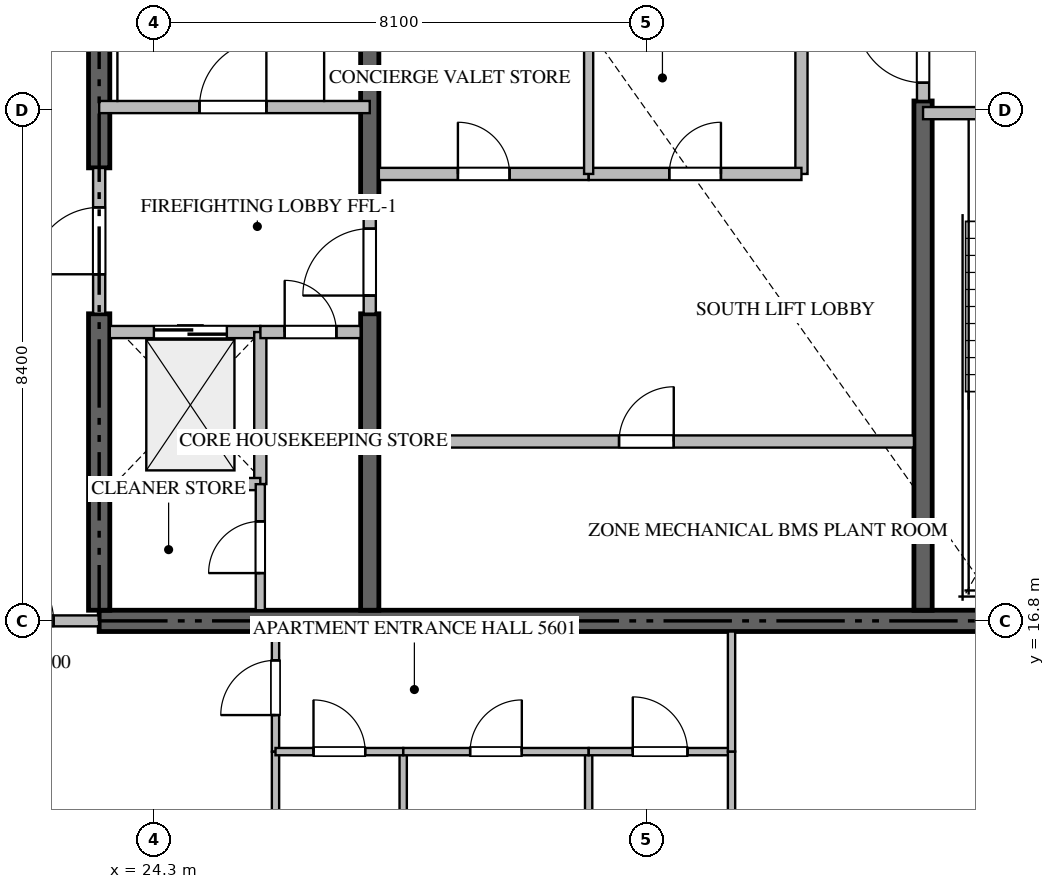
"""IFC4 building model, lengths in metres.
Left out: names, types, materials, properties, quantities, classifications, styles, units other than length and angle.
Written with IfcOpenShell. Run it as: python <this file> out.ifc"""

import sys

from ifc_helpers import new_model, si_unit, direction, frame, frame_2d, origin, place, context, subcontext, project, spatial, rectangle, extrude, source, transform, mapped, element, fill, save


model = new_model("IFC4")
c1 = context("Model", 3, precision=1e-05, world=origin(), true_north=direction((0.0, 1.0)))
c2 = subcontext(c1, "Body", "Model", "MODEL_VIEW")
j1 = project(units=[si_unit("LENGTHUNIT", "METRE"), si_unit("PLANEANGLEUNIT", "RADIAN")], contexts=[c1])
p1 = place(None, origin())
s1 = spatial("IfcSite", under=j1, at=p1, CompositionType="ELEMENT")
p2 = place(p1, origin())
s2 = spatial("IfcBuilding", under=s1, at=p2, CompositionType="ELEMENT")
p3 = place(p2, frame((0.0, 0.0, 225.85)))
s3 = spatial("IfcBuildingStorey", under=s2, at=p3, CompositionType="ELEMENT", Elevation=225.85)
p4 = place(p3, frame((23.4, 16.8, -0.26), z_axis=(0.0, 0.0, 1.0), x_axis=(1.0, 0.0, 0.0)))
e1 = element("IfcWall", 1, at=p4, inside=s3, PredefinedType="SHEAR", context=c2, shape_type="SweptSolid", body=[
    extrude(rectangle(XDim=18.0, YDim=0.35, at=frame_2d((9.0, 0.0))), origin(), (0.0, 0.0, 1.0), 3.848),
])
p5 = place(p3, frame((23.4, 16.975, -0.26), z_axis=(0.0, 0.0, 1.0), x_axis=(0.0, 1.0, 0.0)))
e2 = element("IfcWall", 2, at=p5, inside=s3, PredefinedType="SHEAR", context=c2, shape_type="SweptSolid", body=[
    extrude(rectangle(XDim=4.875, YDim=0.35, at=frame_2d((2.438, 0.0))), origin(), (0.0, 0.0, 1.0), 3.848),
])
p6 = place(p3, frame((23.4, 24.25, -0.26), z_axis=(0.0, 0.0, 1.0), x_axis=(0.0, 1.0, 0.0)))
e3 = element("IfcWall", 3, at=p6, inside=s3, PredefinedType="SHEAR", context=c2, shape_type="SweptSolid", body=[
    extrude(rectangle(XDim=9.175, YDim=0.35, at=frame_2d((4.587, 0.0))), origin(), (0.0, 0.0, 1.0), 3.848),
])
p7 = place(p3, frame((27.85, 16.975, -0.26), z_axis=(0.0, 0.0, 1.0), x_axis=(0.0, 1.0, 0.0)))
e4 = element("IfcWall", 4, at=p7, inside=s3, PredefinedType="SHEAR", context=c2, shape_type="SweptSolid", body=[
    extrude(rectangle(XDim=4.875, YDim=0.3, at=frame_2d((2.438, 0.0))), origin(), (0.0, 0.0, 1.0), 3.848),
])
p8 = place(p3, frame((27.85, 23.55, -0.26), z_axis=(0.0, 0.0, 1.0), x_axis=(0.0, 1.0, 0.0)))
e5 = element("IfcWall", 5, at=p8, inside=s3, PredefinedType="SHEAR", context=c2, shape_type="SweptSolid", body=[
    extrude(rectangle(XDim=9.875, YDim=0.3, at=frame_2d((4.938, 0.0))), origin(), (0.0, 0.0, 1.0), 3.848),
])
p9 = place(p3, frame((36.95, 16.975, -0.26), z_axis=(0.0, 0.0, 1.0), x_axis=(0.0, 1.0, 0.0)))
e6 = element("IfcWall", 6, at=p9, inside=s3, PredefinedType="SHEAR", context=c2, shape_type="SweptSolid", body=[
    extrude(rectangle(XDim=8.375, YDim=0.3, at=frame_2d((4.188, 0.0))), origin(), (0.0, 0.0, 1.0), 3.848),
])
p10 = place(p3, frame((23.4, 25.25, 0.0), z_axis=(0.0, 0.0, 1.0), x_axis=(1.0, 0.0, 0.0)))
e7 = element("IfcWall", 7, at=p10, inside=s3, PredefinedType="STANDARD", context=c2, shape_type="SweptSolid", body=[
    extrude(rectangle(XDim=4.45, YDim=0.2, at=frame_2d((2.225, 0.0))), origin(), (0.0, 0.0, 1.0), 3.59),
])
p11 = place(p10, frame((1.65, 0.0, 0.0)))
e8 = element("IfcOpeningElement", 8, at=p11, cuts=e7, PredefinedType="OPENING", context=c2, shape_type="SweptSolid", body=[
    extrude(rectangle(XDim=1.1, YDim=2.15, at=frame_2d((0.55, 1.075))), frame((0.0, 0.11, 0.0), z_axis=(0.0, -1.0, 0.0), x_axis=(1.0, 0.0, 0.0)), (0.0, 0.0, 1.0), 0.22),
])
p12 = place(p3, frame((36.95, 25.15, 0.0), z_axis=(0.0, 0.0, 1.0), x_axis=(1.0, 0.0, 0.0)))
e9 = element("IfcWall", 9, at=p12, inside=s3, PredefinedType="STANDARD", context=c2, shape_type="SweptSolid", body=[
    extrude(rectangle(XDim=4.45, YDim=0.2, at=frame_2d((2.225, 0.0))), origin(), (0.0, 0.0, 1.0), 3.59),
])
p13 = place(p12, frame((1.65, 0.0, 0.0)))
e10 = element("IfcOpeningElement", 10, at=p13, cuts=e9, PredefinedType="OPENING", context=c2, shape_type="SweptSolid", body=[
    extrude(rectangle(XDim=1.1, YDim=2.15, at=frame_2d((0.55, 1.075))), frame((0.0, 0.11, 0.0), z_axis=(0.0, -1.0, 0.0), x_axis=(1.0, 0.0, 0.0)), (0.0, 0.0, 1.0), 0.22),
])
p14 = place(p3, frame((23.575, 21.55, 0.0), z_axis=(0.0, 0.0, 1.0), x_axis=(1.0, 0.0, 0.0)))
e11 = element("IfcWall", 11, at=p14, inside=s3, PredefinedType="STANDARD", context=c2, shape_type="SweptSolid", body=[
    extrude(rectangle(XDim=2.475, YDim=0.2, at=frame_2d((1.238, 0.0))), origin(), (0.0, 0.0, 1.0), 3.59),
])
p15 = place(p14, frame((0.725, 0.0, 0.0)))
e12 = element("IfcOpeningElement", 12, at=p15, cuts=e11, PredefinedType="OPENING", context=c2, shape_type="SweptSolid", body=[
    extrude(rectangle(XDim=1.2, YDim=2.2, at=frame_2d((0.6, 1.1))), frame((0.0, 0.11, 0.0), z_axis=(0.0, -1.0, 0.0), x_axis=(1.0, 0.0, 0.0)), (0.0, 0.0, 1.0), 0.22),
])
p16 = place(p3, frame((26.05, 19.05, 0.0), z_axis=(0.0, 0.0, 1.0), x_axis=(0.0, 1.0, 0.0)))
e13 = element("IfcWall", 13, at=p16, inside=s3, PredefinedType="STANDARD", context=c2, shape_type="SweptSolid", body=[
    extrude(rectangle(XDim=2.5, YDim=0.2, at=frame_2d((1.25, 0.0))), origin(), (0.0, 0.0, 1.0), 3.59),
])
p17 = place(p3, frame((23.575, 19.05, 0.0), z_axis=(0.0, 0.0, 1.0), x_axis=(1.0, 0.0, 0.0)))
e14 = element("IfcWall", 14, at=p17, inside=s3, PredefinedType="STANDARD", context=c2, shape_type="SweptSolid", body=[
    extrude(rectangle(XDim=2.475, YDim=0.2, at=frame_2d((1.238, 0.0))), origin(), (0.0, 0.0, 1.0), 3.59),
])
p18 = place(p3, frame((26.052, 21.55, 0.0), z_axis=(0.0, 0.0, 1.0), x_axis=(1.0, 0.0, 0.0)))
e15 = element("IfcWall", 15, at=p18, inside=s3, PredefinedType="STANDARD", context=c2, shape_type="SweptSolid", body=[
    extrude(rectangle(XDim=1.648, YDim=0.2, at=frame_2d((0.824, 0.0))), origin(), (0.0, 0.0, 1.0), 3.59),
])
p19 = place(p18, frame((0.399, 0.0, 0.0)))
e16 = element("IfcOpeningElement", 16, at=p19, cuts=e15, PredefinedType="OPENING", context=c2, shape_type="SweptSolid", body=[
    extrude(rectangle(XDim=0.85, YDim=2.1, at=frame_2d((0.425, 1.05))), frame((0.0, 0.11, 0.0), z_axis=(0.0, -1.0, 0.0), x_axis=(1.0, 0.0, 0.0)), (0.0, 0.0, 1.0), 0.22),
])
p20 = place(p3, frame((23.4, 21.852, 0.0), z_axis=(0.0, 0.0, 1.0), x_axis=(0.0, 1.0, 0.0)))
e17 = element("IfcWall", 17, at=p20, inside=s3, PredefinedType="STANDARD", context=c2, shape_type="SweptSolid", body=[
    extrude(rectangle(XDim=2.396, YDim=0.2, at=frame_2d((1.198, 0.0))), origin(), (0.0, 0.0, 1.0), 3.59),
])
p21 = place(p20, frame((0.648, 0.0, 0.0)))
e18 = element("IfcOpeningElement", 18, at=p21, cuts=e17, PredefinedType="OPENING", context=c2, shape_type="SweptSolid", body=[
    extrude(rectangle(XDim=1.1, YDim=2.15, at=frame_2d((0.55, 1.075))), frame((0.0, 0.11, 0.0), z_axis=(0.0, -1.0, 0.0), x_axis=(1.0, 0.0, 0.0)), (0.0, 0.0, 1.0), 0.22),
])
p22 = place(p3, frame((27.85, 21.852, 0.0), z_axis=(0.0, 0.0, 1.0), x_axis=(0.0, 1.0, 0.0)))
e19 = element("IfcWall", 19, at=p22, inside=s3, PredefinedType="STANDARD", context=c2, shape_type="SweptSolid", body=[
    extrude(rectangle(XDim=1.696, YDim=0.2, at=frame_2d((0.848, 0.0))), origin(), (0.0, 0.0, 1.0), 3.59),
])
p23 = place(p22, frame((0.298, 0.0, 0.0)))
e20 = element("IfcOpeningElement", 20, at=p23, cuts=e19, PredefinedType="OPENING", context=c2, shape_type="SweptSolid", body=[
    extrude(rectangle(XDim=1.1, YDim=2.15, at=frame_2d((0.55, 1.075))), frame((0.0, 0.11, 0.0), z_axis=(0.0, -1.0, 0.0), x_axis=(1.0, 0.0, 0.0)), (0.0, 0.0, 1.0), 0.22),
])
p24 = place(p3, frame((36.95, 25.352, 0.0), z_axis=(0.0, 0.0, 1.0), x_axis=(0.0, 1.0, 0.0)))
e21 = element("IfcWall", 21, at=p24, inside=s3, PredefinedType="STANDARD", context=c2, shape_type="SweptSolid", body=[
    extrude(rectangle(XDim=1.696, YDim=0.2, at=frame_2d((0.848, 0.0))), origin(), (0.0, 0.0, 1.0), 3.59),
])
p25 = place(p24, frame((0.298, 0.0, 0.0)))
e22 = element("IfcOpeningElement", 22, at=p25, cuts=e21, PredefinedType="OPENING", context=c2, shape_type="SweptSolid", body=[
    extrude(rectangle(XDim=1.1, YDim=2.15, at=frame_2d((0.55, 1.075))), frame((0.0, 0.11, 0.0), z_axis=(0.0, -1.0, 0.0), x_axis=(1.0, 0.0, 0.0)), (0.0, 0.0, 1.0), 0.22),
])
p26 = place(p3, frame((26.05, 16.975, 0.0), z_axis=(0.0, 0.0, 1.0), x_axis=(0.0, 1.0, 0.0)))
e23 = element("IfcWall", 23, at=p26, inside=s3, PredefinedType="PARTITIONING", context=c2, shape_type="SweptSolid", body=[
    extrude(rectangle(XDim=2.073, YDim=0.15, at=frame_2d((1.037, 0.0))), origin(), (0.0, 0.0, 1.0), 3.59),
])
p27 = place(p26, frame((0.611, 0.0, 0.0)))
e24 = element("IfcOpeningElement", 24, at=p27, cuts=e23, PredefinedType="OPENING", context=c2, shape_type="SweptSolid", body=[
    extrude(rectangle(XDim=0.85, YDim=2.1, at=frame_2d((0.425, 1.05))), frame((0.0, 0.085, 0.0), z_axis=(0.0, -1.0, 0.0), x_axis=(1.0, 0.0, 0.0)), (0.0, 0.0, 1.0), 0.17),
])
p28 = place(p3, frame((28.0, 19.75, 0.0), z_axis=(0.0, 0.0, 1.0), x_axis=(1.0, 0.0, 0.0)))
e25 = element("IfcWall", 25, at=p28, inside=s3, PredefinedType="STANDARD", context=c2, shape_type="SweptSolid", body=[
    extrude(rectangle(XDim=8.8, YDim=0.2, at=frame_2d((4.4, 0.0))), origin(), (0.0, 0.0, 1.0), 3.59),
])
p29 = place(p28, frame((3.95, 0.0, 0.0)))
e26 = element("IfcOpeningElement", 26, at=p29, cuts=e25, PredefinedType="OPENING", context=c2, shape_type="SweptSolid", body=[
    extrude(rectangle(XDim=0.9, YDim=2.1, at=frame_2d((0.45, 1.05))), frame((0.0, 0.11, 0.0), z_axis=(0.0, -1.0, 0.0), x_axis=(1.0, 0.0, 0.0)), (0.0, 0.0, 1.0), 0.22),
])
p30 = place(p3, frame((34.95, 24.15, 0.0), z_axis=(0.0, 0.0, 1.0), x_axis=(0.0, 1.0, 0.0)))
e27 = element("IfcWall", 27, at=p30, inside=s3, PredefinedType="STANDARD", context=c2, shape_type="SweptSolid", body=[
    extrude(rectangle(XDim=2.8, YDim=0.2, at=frame_2d((1.4, 0.0))), origin(), (0.0, 0.0, 1.0), 3.59),
])
p31 = place(p3, frame((28.0, 24.15, 0.0), z_axis=(0.0, 0.0, 1.0), x_axis=(1.0, 0.0, 0.0)))
e28 = element("IfcWall", 28, at=p31, inside=s3, PredefinedType="STANDARD", context=c2, shape_type="SweptSolid", body=[
    extrude(rectangle(XDim=3.45, YDim=0.2, at=frame_2d((1.725, 0.0))), origin(), (0.0, 0.0, 1.0), 3.59),
])
p32 = place(p31, frame((1.3, 0.0, 0.0)))
e29 = element("IfcOpeningElement", 29, at=p32, cuts=e28, PredefinedType="OPENING", context=c2, shape_type="SweptSolid", body=[
    extrude(rectangle(XDim=0.85, YDim=2.1, at=frame_2d((0.425, 1.05))), frame((0.0, 0.11, 0.0), z_axis=(0.0, -1.0, 0.0), x_axis=(1.0, 0.0, 0.0)), (0.0, 0.0, 1.0), 0.22),
])
p33 = place(p3, frame((31.452, 24.15, 0.0), z_axis=(0.0, 0.0, 1.0), x_axis=(1.0, 0.0, 0.0)))
e30 = element("IfcWall", 30, at=p33, inside=s3, PredefinedType="STANDARD", context=c2, shape_type="SweptSolid", body=[
    extrude(rectangle(XDim=3.498, YDim=0.2, at=frame_2d((1.749, 0.0))), origin(), (0.0, 0.0, 1.0), 3.59),
])
p34 = place(p33, frame((1.324, 0.0, 0.0)))
e31 = element("IfcOpeningElement", 31, at=p34, cuts=e30, PredefinedType="OPENING", context=c2, shape_type="SweptSolid", body=[
    extrude(rectangle(XDim=0.85, YDim=2.1, at=frame_2d((0.425, 1.05))), frame((0.0, 0.11, 0.0), z_axis=(0.0, -1.0, 0.0), x_axis=(1.0, 0.0, 0.0)), (0.0, 0.0, 1.0), 0.22),
])
p35 = place(p3, frame((31.45, 24.15, 0.0), z_axis=(0.0, 0.0, 1.0), x_axis=(0.0, 1.0, 0.0)))
e32 = element("IfcWall", 32, at=p35, inside=s3, PredefinedType="PARTITIONING", context=c2, shape_type="SweptSolid", body=[
    extrude(rectangle(XDim=2.8, YDim=0.15, at=frame_2d((1.4, 0.0))), origin(), (0.0, 0.0, 1.0), 3.59),
])
p36 = place(p3, frame((20.902, 16.8, 0.0), z_axis=(0.0, 0.0, 1.0), x_axis=(1.0, 0.0, 0.0)))
e33 = element("IfcWall", 33, at=p36, inside=s3, PredefinedType="PARTITIONING", context=c2, shape_type="SweptSolid", body=[
    extrude(rectangle(XDim=2.496, YDim=0.18, at=frame_2d((1.248, 0.0))), origin(), (0.0, 0.0, 1.0), 3.59),
])
p37 = place(p36, frame((0.748, 0.0, 0.0)))
e34 = element("IfcOpeningElement", 34, at=p37, cuts=e33, PredefinedType="OPENING", context=c2, shape_type="SweptSolid", body=[
    extrude(rectangle(XDim=1.0, YDim=2.15, at=frame_2d((0.5, 1.075))), frame((0.0, 0.1, 0.0), z_axis=(0.0, -1.0, 0.0), x_axis=(1.0, 0.0, 0.0)), (0.0, 0.0, 1.0), 0.2),
])
p38 = place(p3, frame((26.3, 14.65, 0.0), z_axis=(0.0, 0.0, 1.0), x_axis=(0.0, 1.0, 0.0)))
e35 = element("IfcWall", 35, at=p38, inside=s3, PredefinedType="PARTITIONING", context=c2, shape_type="SweptSolid", body=[
    extrude(rectangle(XDim=1.975, YDim=0.12, at=frame_2d((0.988, 0.0))), origin(), (0.0, 0.0, 1.0), 3.59),
])
p39 = place(p38, frame((0.601, 0.0, 0.0)))
e36 = element("IfcOpeningElement", 36, at=p39, cuts=e35, PredefinedType="OPENING", context=c2, shape_type="SweptSolid", body=[
    extrude(rectangle(XDim=0.9, YDim=2.1, at=frame_2d((0.45, 1.05))), frame((0.0, 0.07, 0.0), z_axis=(0.0, -1.0, 0.0), x_axis=(1.0, 0.0, 0.0)), (0.0, 0.0, 1.0), 0.14),
])
p40 = place(p3, frame((26.3, 7.862, 0.0), z_axis=(0.0, 0.0, 1.0), x_axis=(0.0, 1.0, 0.0)))
e37 = element("IfcWall", 37, at=p40, inside=s3, PredefinedType="PARTITIONING", context=c2, shape_type="SweptSolid", body=[
    extrude(rectangle(XDim=6.786, YDim=0.12, at=frame_2d((3.393, 0.0))), origin(), (0.0, 0.0, 1.0), 3.59),
])
p41 = place(p3, frame((31.45, 1.295, 0.0), z_axis=(0.0, 0.0, 1.0), x_axis=(0.0, 1.0, 0.0)))
e38 = element("IfcWall", 38, at=p41, inside=s3, PredefinedType="PARTITIONING", context=c2, shape_type="SweptSolid", body=[
    extrude(rectangle(XDim=13.355, YDim=0.12, at=frame_2d((6.677, 0.0))), origin(), (0.0, 0.0, 1.0), 3.59),
])
p42 = place(p3, frame((28.4, 7.86, 0.0), z_axis=(0.0, 0.0, 1.0), x_axis=(0.0, 1.0, 0.0)))
e39 = element("IfcWall", 39, at=p42, inside=s3, PredefinedType="PARTITIONING", context=c2, shape_type="SweptSolid", body=[
    extrude(rectangle(XDim=6.79, YDim=0.12, at=frame_2d((3.395, 0.0))), origin(), (0.0, 0.0, 1.0), 3.59),
])
p43 = place(p3, frame((26.3, 14.65, 0.0), z_axis=(0.0, 0.0, 1.0), x_axis=(1.0, 0.0, 0.0)))
e40 = element("IfcWall", 40, at=p43, inside=s3, PredefinedType="PARTITIONING", context=c2, shape_type="SweptSolid", body=[
    extrude(rectangle(XDim=2.1, YDim=0.12, at=frame_2d((1.05, 0.0))), origin(), (0.0, 0.0, 1.0), 3.59),
])
p44 = place(p43, frame((0.625, 0.0, 0.0)))
e41 = element("IfcOpeningElement", 41, at=p44, cuts=e40, PredefinedType="OPENING", context=c2, shape_type="SweptSolid", body=[
    extrude(rectangle(XDim=0.85, YDim=2.1, at=frame_2d((0.425, 1.05))), frame((0.0, 0.07, 0.0), z_axis=(0.0, -1.0, 0.0), x_axis=(1.0, 0.0, 0.0)), (0.0, 0.0, 1.0), 0.14),
])
p45 = place(p3, frame((28.402, 14.65, 0.0), z_axis=(0.0, 0.0, 1.0), x_axis=(1.0, 0.0, 0.0)))
e42 = element("IfcWall", 42, at=p45, inside=s3, PredefinedType="PARTITIONING", context=c2, shape_type="SweptSolid", body=[
    extrude(rectangle(XDim=3.048, YDim=0.12, at=frame_2d((1.524, 0.0))), origin(), (0.0, 0.0, 1.0), 3.59),
])
p46 = place(p45, frame((1.099, 0.0, 0.0)))
e43 = element("IfcOpeningElement", 43, at=p46, cuts=e42, PredefinedType="OPENING", context=c2, shape_type="SweptSolid", body=[
    extrude(rectangle(XDim=0.85, YDim=2.1, at=frame_2d((0.425, 1.05))), frame((0.0, 0.07, 0.0), z_axis=(0.0, -1.0, 0.0), x_axis=(1.0, 0.0, 0.0)), (0.0, 0.0, 1.0), 0.14),
])
p47 = place(p3, frame((31.452, 14.65, 0.0), z_axis=(0.0, 0.0, 1.0), x_axis=(1.0, 0.0, 0.0)))
e44 = element("IfcWall", 44, at=p47, inside=s3, PredefinedType="PARTITIONING", context=c2, shape_type="SweptSolid", body=[
    extrude(rectangle(XDim=2.348, YDim=0.12, at=frame_2d((1.174, 0.0))), origin(), (0.0, 0.0, 1.0), 3.59),
])
p48 = place(p47, frame((0.724, 0.0, 0.0)))
e45 = element("IfcOpeningElement", 45, at=p48, cuts=e44, PredefinedType="OPENING", context=c2, shape_type="SweptSolid", body=[
    extrude(rectangle(XDim=0.9, YDim=2.1, at=frame_2d((0.45, 1.05))), frame((0.0, 0.07, 0.0), z_axis=(0.0, -1.0, 0.0), x_axis=(1.0, 0.0, 0.0)), (0.0, 0.0, 1.0), 0.14),
])
p49 = place(p3, frame((33.8, 8.59, 0.0), z_axis=(0.0, 0.0, 1.0), x_axis=(0.0, 1.0, 0.0)))
e46 = element("IfcWall", 46, at=p49, inside=s3, PredefinedType="PARTITIONING", context=c2, shape_type="SweptSolid", body=[
    extrude(rectangle(XDim=6.06, YDim=0.12, at=frame_2d((3.03, 0.0))), origin(), (0.0, 0.0, 1.0), 3.59),
])
p50 = place(p49, frame((2.605, 0.0, 0.0)))
e47 = element("IfcOpeningElement", 47, at=p50, cuts=e46, PredefinedType="OPENING", context=c2, shape_type="SweptSolid", body=[
    extrude(rectangle(XDim=0.85, YDim=2.1, at=frame_2d((0.425, 1.05))), frame((0.0, 0.07, 0.0), z_axis=(0.0, -1.0, 0.0), x_axis=(1.0, 0.0, 0.0)), (0.0, 0.0, 1.0), 0.14),
])
p51 = place(p3, frame((33.8, 14.652, 0.0), z_axis=(0.0, 0.0, 1.0), x_axis=(0.0, 1.0, 0.0)))
e48 = element("IfcWall", 48, at=p51, inside=s3, PredefinedType="PARTITIONING", context=c2, shape_type="SweptSolid", body=[
    extrude(rectangle(XDim=1.973, YDim=0.12, at=frame_2d((0.986, 0.0))), origin(), (0.0, 0.0, 1.0), 3.59),
])
m1 = source(origin(), c2, "Body", "SweptSolid", [
    extrude(rectangle(XDim=1.1, YDim=2.15, at=frame_2d((0.55, 1.075))), frame((0.0, 0.025, 0.0), z_axis=(0.0, -1.0, 0.0), x_axis=(1.0, 0.0, 0.0)), (0.0, 0.0, 1.0), 0.05),
])
p52 = place(p11, origin())
e49 = element("IfcDoor", 49, at=p52, inside=s3, OperationType="SINGLE_SWING_RIGHT", PredefinedType="DOOR", context=c2, shape_type="MappedRepresentation", body=[
    mapped(m1, transform((0.0, 0.0, 0.0), scale=1.0)),
])
fill(e8, e49)
m2 = source(origin(), c2, "Body", "SweptSolid", [
    extrude(rectangle(XDim=1.2, YDim=2.2, at=frame_2d((0.6, 1.1))), frame((0.0, 0.025, 0.0), z_axis=(0.0, -1.0, 0.0), x_axis=(1.0, 0.0, 0.0)), (0.0, 0.0, 1.0), 0.05),
])
p53 = place(p15, origin())
e50 = element("IfcDoor", 50, at=p53, inside=s3, OperationType="DOUBLE_DOOR_SLIDING", PredefinedType="DOOR", context=c2, shape_type="MappedRepresentation", body=[
    mapped(m2, transform((0.0, 0.0, 0.0), scale=1.0)),
])
fill(e12, e50)
m3 = source(origin(), c2, "Body", "SweptSolid", [
    extrude(rectangle(XDim=0.85, YDim=2.1, at=frame_2d((0.425, 1.05))), frame((0.0, 0.025, 0.0), z_axis=(0.0, -1.0, 0.0), x_axis=(1.0, 0.0, 0.0)), (0.0, 0.0, 1.0), 0.05),
])
p54 = place(p19, origin())
e51 = element("IfcDoor", 51, at=p54, inside=s3, OperationType="SINGLE_SWING_LEFT", PredefinedType="DOOR", context=c2, shape_type="MappedRepresentation", body=[
    mapped(m3, transform((0.0, 0.0, 0.0), scale=1.0)),
])
fill(e16, e51)
p55 = place(p21, origin())
e52 = element("IfcDoor", 52, at=p55, inside=s3, OperationType="SINGLE_SWING_LEFT", PredefinedType="DOOR", context=c2, shape_type="MappedRepresentation", body=[
    mapped(m1, transform((0.0, 0.0, 0.0), scale=1.0)),
])
fill(e18, e52)
p56 = place(p23, origin())
e53 = element("IfcDoor", 53, at=p56, inside=s3, OperationType="SINGLE_SWING_LEFT", PredefinedType="DOOR", context=c2, shape_type="MappedRepresentation", body=[
    mapped(m1, transform((0.0, 0.0, 0.0), scale=1.0)),
])
fill(e20, e53)
p57 = place(p25, origin())
e54 = element("IfcDoor", 54, at=p57, inside=s3, OperationType="SINGLE_SWING_RIGHT", PredefinedType="DOOR", context=c2, shape_type="MappedRepresentation", body=[
    mapped(m1, transform((0.0, 0.0, 0.0), scale=1.0)),
])
fill(e22, e54)
p58 = place(p27, origin())
e55 = element("IfcDoor", 55, at=p58, inside=s3, OperationType="SINGLE_SWING_LEFT", PredefinedType="DOOR", context=c2, shape_type="MappedRepresentation", body=[
    mapped(m3, transform((0.0, 0.0, 0.0), scale=1.0)),
])
fill(e24, e55)
m4 = source(origin(), c2, "Body", "SweptSolid", [
    extrude(rectangle(XDim=0.9, YDim=2.1, at=frame_2d((0.45, 1.05))), frame((0.0, 0.025, 0.0), z_axis=(0.0, -1.0, 0.0), x_axis=(1.0, 0.0, 0.0)), (0.0, 0.0, 1.0), 0.05),
])
p59 = place(p29, origin())
e56 = element("IfcDoor", 56, at=p59, inside=s3, OperationType="SINGLE_SWING_RIGHT", PredefinedType="DOOR", context=c2, shape_type="MappedRepresentation", body=[
    mapped(m4, transform((0.0, 0.0, 0.0), scale=1.0)),
])
fill(e26, e56)
p60 = place(p32, origin())
e57 = element("IfcDoor", 57, at=p60, inside=s3, OperationType="SINGLE_SWING_LEFT", PredefinedType="DOOR", context=c2, shape_type="MappedRepresentation", body=[
    mapped(m3, transform((0.0, 0.0, 0.0), scale=1.0)),
])
fill(e29, e57)
p61 = place(p34, origin())
e58 = element("IfcDoor", 58, at=p61, inside=s3, OperationType="SINGLE_SWING_RIGHT", PredefinedType="DOOR", context=c2, shape_type="MappedRepresentation", body=[
    mapped(m3, transform((0.0, 0.0, 0.0), scale=1.0)),
])
fill(e31, e58)
m5 = source(origin(), c2, "Body", "SweptSolid", [
    extrude(rectangle(XDim=1.0, YDim=2.15, at=frame_2d((0.5, 1.075))), frame((0.0, 0.025, 0.0), z_axis=(0.0, -1.0, 0.0), x_axis=(1.0, 0.0, 0.0)), (0.0, 0.0, 1.0), 0.05),
])
p62 = place(p37, origin())
e59 = element("IfcDoor", 59, at=p62, inside=s3, OperationType="SINGLE_SWING_LEFT", PredefinedType="DOOR", context=c2, shape_type="MappedRepresentation", body=[
    mapped(m5, transform((0.0, 0.0, 0.0), scale=1.0)),
])
fill(e34, e59)
p63 = place(p39, origin())
e60 = element("IfcDoor", 60, at=p63, inside=s3, OperationType="SINGLE_SWING_LEFT", PredefinedType="DOOR", context=c2, shape_type="MappedRepresentation", body=[
    mapped(m4, transform((0.0, 0.0, 0.0), scale=1.0)),
])
fill(e36, e60)
p64 = place(p44, origin())
e61 = element("IfcDoor", 61, at=p64, inside=s3, OperationType="SINGLE_SWING_LEFT", PredefinedType="DOOR", context=c2, shape_type="MappedRepresentation", body=[
    mapped(m3, transform((0.0, 0.0, 0.0), scale=1.0)),
])
fill(e41, e61)
p65 = place(p46, origin())
e62 = element("IfcDoor", 62, at=p65, inside=s3, OperationType="SINGLE_SWING_RIGHT", PredefinedType="DOOR", context=c2, shape_type="MappedRepresentation", body=[
    mapped(m3, transform((0.0, 0.0, 0.0), scale=1.0)),
])
fill(e43, e62)
p66 = place(p48, origin())
e63 = element("IfcDoor", 63, at=p66, inside=s3, OperationType="SINGLE_SWING_LEFT", PredefinedType="DOOR", context=c2, shape_type="MappedRepresentation", body=[
    mapped(m4, transform((0.0, 0.0, 0.0), scale=1.0)),
])
fill(e45, e63)
save(model, sys.argv[1])
